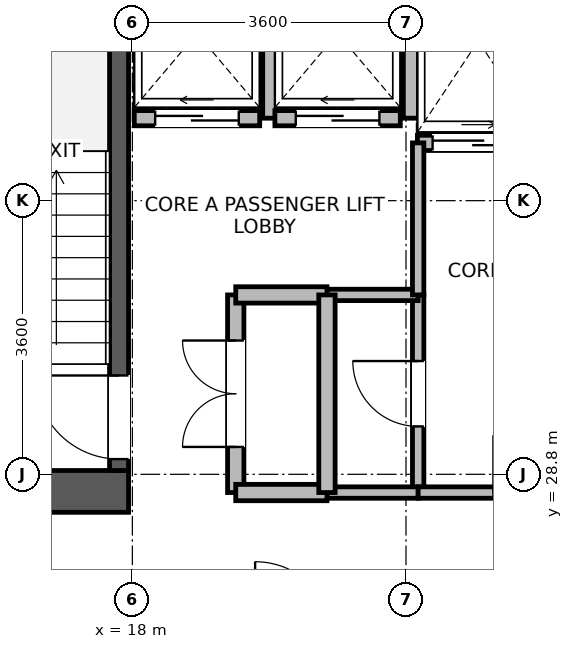
"""IFC4 building model, lengths in metres.
Left out: names, types, materials, properties, quantities, classifications, styles, units other than length and angle.
Written with IfcOpenShell. Run it as: python <this file> out.ifc"""

import sys

from ifc_helpers import new_model, si_unit, direction, frame, frame_2d, origin, place, context, subcontext, project, spatial, rectangle, extrude, element, fill, save


model = new_model("IFC4")
c1 = context("Model", 3, precision=1e-05, world=origin(), true_north=direction((0.0, 1.0)))
c2 = subcontext(c1, "Body", "Model", "MODEL_VIEW")
j1 = project(units=[si_unit("LENGTHUNIT", "METRE"), si_unit("PLANEANGLEUNIT", "RADIAN")], contexts=[c1])
p1 = place(None, origin())
s1 = spatial("IfcSite", under=j1, at=p1, CompositionType="ELEMENT")
p2 = place(p1, origin())
s2 = spatial("IfcBuilding", under=s1, at=p2, CompositionType="ELEMENT")
p3 = place(p2, frame((0.0, 0.0, 43.8)))
s3 = spatial("IfcBuildingStorey", under=s2, at=p3, CompositionType="ELEMENT", Elevation=43.8)
p4 = place(p3, frame((14.75, 28.575, 0.0), z_axis=(0.0, 0.0, 1.0), x_axis=(1.0, 0.0, 0.0)))
e1 = element("IfcWall", 1, at=p4, inside=s3, PredefinedType="SHEAR", context=c2, shape_type="SweptSolid", body=[
    extrude(rectangle(XDim=3.2, YDim=0.55, at=frame_2d((1.6, 0.0))), origin(), (0.0, 0.0, 1.0), 3.45),
])
p5 = place(p3, frame((17.825, 28.85, 0.0), z_axis=(0.0, 0.0, 1.0), x_axis=(0.0, 1.0, 0.0)))
e2 = element("IfcWall", 2, at=p5, inside=s3, PredefinedType="SHEAR", context=c2, shape_type="SweptSolid", body=[
    extrude(rectangle(XDim=7.0, YDim=0.25, at=frame_2d((3.5, 0.0))), origin(), (0.0, 0.0, 1.0), 3.45),
])
p6 = place(p5, frame((0.15, 0.0, 0.0)))
e3 = element("IfcOpeningElement", 3, at=p6, cuts=e2, PredefinedType="OPENING", context=c2, shape_type="SweptSolid", body=[
    extrude(rectangle(XDim=1.1, YDim=2.08, at=frame_2d((0.55, 1.04))), frame((0.0, 0.135, 0.0), z_axis=(0.0, -1.0, 0.0), x_axis=(1.0, 0.0, 0.0)), (0.0, 0.0, 1.0), 0.27),
])
p7 = place(p3, frame((18.025, 33.485, 0.0), z_axis=(0.0, 0.0, 1.0), x_axis=(1.0, 0.0, 0.0)))
e4 = element("IfcWall", 4, at=p7, inside=s3, PredefinedType="PARTITIONING", context=c2, shape_type="SweptSolid", body=[
    extrude(rectangle(XDim=1.65, YDim=0.2, at=frame_2d((0.825, 0.0))), origin(), (0.0, 0.0, 1.0), 3.43),
])
p8 = place(p7, frame((0.275, 0.0, 0.0)))
e5 = element("IfcOpeningElement", 5, at=p8, cuts=e4, PredefinedType="OPENING", context=c2, shape_type="SweptSolid", body=[
    extrude(rectangle(XDim=1.1, YDim=2.12, at=frame_2d((0.55, 1.06))), frame((0.0, 0.11, 0.0), z_axis=(0.0, -1.0, 0.0), x_axis=(1.0, 0.0, 0.0)), (0.0, 0.0, 1.0), 0.22),
])
p9 = place(p3, frame((19.815, 33.485, 0.0), z_axis=(0.0, 0.0, 1.0), x_axis=(0.0, 1.0, 0.0)))
e6 = element("IfcWall", 6, at=p9, inside=s3, PredefinedType="PARTITIONING", context=c2, shape_type="SweptSolid", body=[
    extrude(rectangle(XDim=2.23, YDim=0.2, at=frame_2d((1.115, 0.0))), origin(), (0.0, 0.0, 1.0), 3.43),
])
p10 = place(p3, frame((19.875, 33.485, 0.0), z_axis=(0.0, 0.0, 1.0), x_axis=(1.0, 0.0, 0.0)))
e7 = element("IfcWall", 7, at=p10, inside=s3, PredefinedType="PARTITIONING", context=c2, shape_type="SweptSolid", body=[
    extrude(rectangle(XDim=1.65, YDim=0.2, at=frame_2d((0.825, 0.0))), origin(), (0.0, 0.0, 1.0), 3.43),
])
p11 = place(p10, frame((0.275, 0.0, 0.0)))
e8 = element("IfcOpeningElement", 8, at=p11, cuts=e7, PredefinedType="OPENING", context=c2, shape_type="SweptSolid", body=[
    extrude(rectangle(XDim=1.1, YDim=2.12, at=frame_2d((0.55, 1.06))), frame((0.0, 0.11, 0.0), z_axis=(0.0, -1.0, 0.0), x_axis=(1.0, 0.0, 0.0)), (0.0, 0.0, 1.0), 0.22),
])
p12 = place(p3, frame((21.665, 33.485, 0.0), z_axis=(0.0, 0.0, 1.0), x_axis=(0.0, 1.0, 0.0)))
e9 = element("IfcWall", 9, at=p12, inside=s3, PredefinedType="PARTITIONING", context=c2, shape_type="SweptSolid", body=[
    extrude(rectangle(XDim=2.23, YDim=0.2, at=frame_2d((1.115, 0.0))), origin(), (0.0, 0.0, 1.0), 3.43),
])
p13 = place(p3, frame((21.75, 33.16, 0.0), z_axis=(0.0, 0.0, 1.0), x_axis=(1.0, 0.0, 0.0)))
e10 = element("IfcWall", 10, at=p13, inside=s3, PredefinedType="PARTITIONING", context=c2, shape_type="SweptSolid", body=[
    extrude(rectangle(XDim=1.6, YDim=0.2, at=frame_2d((0.8, 0.0))), origin(), (0.0, 0.0, 1.0), 3.43),
])
p14 = place(p13, frame((0.2, 0.0, 0.0)))
e11 = element("IfcOpeningElement", 11, at=p14, cuts=e10, PredefinedType="OPENING", context=c2, shape_type="SweptSolid", body=[
    extrude(rectangle(XDim=1.2, YDim=2.12, at=frame_2d((0.6, 1.06))), frame((0.0, 0.11, 0.0), z_axis=(0.0, -1.0, 0.0), x_axis=(1.0, 0.0, 0.0)), (0.0, 0.0, 1.0), 0.22),
])
p15 = place(p3, frame((19.36, 28.56, 0.0), z_axis=(0.0, 0.0, 1.0), x_axis=(0.0, 1.0, 0.0)))
e12 = element("IfcWall", 12, at=p15, inside=s3, PredefinedType="PARTITIONING", context=c2, shape_type="SweptSolid", body=[
    extrude(rectangle(XDim=2.6, YDim=0.215, at=frame_2d((1.3, 0.0))), origin(), (0.0, 0.0, 1.0), 3.43),
])
p16 = place(p15, frame((0.6, 0.0, 0.0)))
e13 = element("IfcOpeningElement", 13, at=p16, cuts=e12, PredefinedType="OPENING", context=c2, shape_type="SweptSolid", body=[
    extrude(rectangle(XDim=1.4, YDim=2.15, at=frame_2d((0.7, 1.075))), frame((0.0, 0.118, 0.0), z_axis=(0.0, -1.0, 0.0), x_axis=(1.0, 0.0, 0.0)), (0.0, 0.0, 1.0), 0.235),
])
p17 = place(p3, frame((21.76, 28.56, 0.0), z_axis=(0.0, 0.0, 1.0), x_axis=(0.0, 1.0, 0.0)))
e14 = element("IfcWall", 14, at=p17, inside=s3, PredefinedType="PARTITIONING", context=c2, shape_type="SweptSolid", body=[
    extrude(rectangle(XDim=2.6, YDim=0.15, at=frame_2d((1.3, 0.0))), origin(), (0.0, 0.0, 1.0), 3.43),
])
p18 = place(p17, frame((0.87, 0.0, 0.0)))
e15 = element("IfcOpeningElement", 15, at=p18, cuts=e14, PredefinedType="OPENING", context=c2, shape_type="SweptSolid", body=[
    extrude(rectangle(XDim=0.86, YDim=2.02, at=frame_2d((0.43, 1.01))), frame((0.0, 0.085, 0.0), z_axis=(0.0, -1.0, 0.0), x_axis=(1.0, 0.0, 0.0)), (0.0, 0.0, 1.0), 0.17),
])
p19 = place(p3, frame((20.56, 28.56, 0.0), z_axis=(0.0, 0.0, 1.0), x_axis=(1.0, 0.0, 0.0)))
e16 = element("IfcWall", 16, at=p19, inside=s3, PredefinedType="PARTITIONING", context=c2, shape_type="SweptSolid", body=[
    extrude(rectangle(XDim=1.2, YDim=0.15, at=frame_2d((0.6, 0.0))), origin(), (0.0, 0.0, 1.0), 2.23),
])
p20 = place(p3, frame((20.56, 31.16, 0.0), z_axis=(0.0, 0.0, 1.0), x_axis=(1.0, 0.0, 0.0)))
e17 = element("IfcWall", 17, at=p20, inside=s3, PredefinedType="PARTITIONING", context=c2, shape_type="SweptSolid", body=[
    extrude(rectangle(XDim=1.2, YDim=0.15, at=frame_2d((0.6, 0.0))), origin(), (0.0, 0.0, 1.0), 3.43),
])
p21 = place(p3, frame((19.36, 28.56, 0.0), z_axis=(0.0, 0.0, 1.0), x_axis=(1.0, 0.0, 0.0)))
e18 = element("IfcWall", 18, at=p21, inside=s3, PredefinedType="PARTITIONING", context=c2, shape_type="SweptSolid", body=[
    extrude(rectangle(XDim=1.2, YDim=0.215, at=frame_2d((0.6, 0.0))), origin(), (0.0, 0.0, 1.0), 2.23),
])
p22 = place(p3, frame((19.36, 31.16, 0.0), z_axis=(0.0, 0.0, 1.0), x_axis=(1.0, 0.0, 0.0)))
e19 = element("IfcWall", 19, at=p22, inside=s3, PredefinedType="PARTITIONING", context=c2, shape_type="SweptSolid", body=[
    extrude(rectangle(XDim=1.2, YDim=0.215, at=frame_2d((0.6, 0.0))), origin(), (0.0, 0.0, 1.0), 3.43),
])
p23 = place(p3, frame((21.76, 28.56, 0.0), z_axis=(0.0, 0.0, 1.0), x_axis=(1.0, 0.0, 0.0)))
e20 = element("IfcWall", 20, at=p23, inside=s3, PredefinedType="PARTITIONING", context=c2, shape_type="SweptSolid", body=[
    extrude(rectangle(XDim=3.48, YDim=0.15, at=frame_2d((1.74, 0.0))), origin(), (0.0, 0.0, 1.0), 2.23),
])
p24 = place(p23, frame((0.99, 0.0, 0.0)))
e21 = element("IfcOpeningElement", 21, at=p24, cuts=e20, PredefinedType="OPENING", context=c2, shape_type="SweptSolid", body=[
    extrude(rectangle(XDim=1.5, YDim=2.1, at=frame_2d((0.75, 1.05))), frame((0.0, 0.085, 0.0), z_axis=(0.0, -1.0, 0.0), x_axis=(1.0, 0.0, 0.0)), (0.0, 0.0, 1.0), 0.17),
])
p25 = place(p3, frame((20.56, 28.56, 0.0), z_axis=(0.0, 0.0, 1.0), x_axis=(0.0, 1.0, 0.0)))
e22 = element("IfcWall", 22, at=p25, inside=s3, PredefinedType="PARTITIONING", context=c2, shape_type="SweptSolid", body=[
    extrude(rectangle(XDim=2.6, YDim=0.215, at=frame_2d((1.3, 0.0))), origin(), (0.0, 0.0, 1.0), 3.43),
])
p26 = place(p3, frame((21.76, 31.16, 0.0), z_axis=(0.0, 0.0, 1.0), x_axis=(0.0, 1.0, 0.0)))
e23 = element("IfcWall", 23, at=p26, inside=s3, PredefinedType="PARTITIONING", context=c2, shape_type="SweptSolid", body=[
    extrude(rectangle(XDim=2.0, YDim=0.15, at=frame_2d((1.0, 0.0))), origin(), (0.0, 0.0, 1.0), 3.43),
])
p27 = place(p6, origin())
e24 = element("IfcDoor", 24, at=p27, inside=s3, OperationType="SINGLE_SWING_RIGHT", PredefinedType="DOOR", context=c2, shape_type="SweptSolid", body=[
    extrude(rectangle(XDim=1.1, YDim=2.08, at=frame_2d((0.55, 1.04))), frame((0.0, 0.025, 0.0), z_axis=(0.0, -1.0, 0.0), x_axis=(1.0, 0.0, 0.0)), (0.0, 0.0, 1.0), 0.05),
])
fill(e3, e24)
p28 = place(p8, origin())
e25 = element("IfcDoor", 25, at=p28, inside=s3, OperationType="SLIDING_TO_LEFT", PredefinedType="DOOR", context=c2, shape_type="SweptSolid", body=[
    extrude(rectangle(XDim=1.1, YDim=2.12, at=frame_2d((0.55, 1.06))), frame((0.0, 0.025, 0.0), z_axis=(0.0, -1.0, 0.0), x_axis=(1.0, 0.0, 0.0)), (0.0, 0.0, 1.0), 0.05),
])
fill(e5, e25)
p29 = place(p11, origin())
e26 = element("IfcDoor", 26, at=p29, inside=s3, OperationType="SLIDING_TO_LEFT", PredefinedType="DOOR", context=c2, shape_type="SweptSolid", body=[
    extrude(rectangle(XDim=1.1, YDim=2.12, at=frame_2d((0.55, 1.06))), frame((0.0, 0.025, 0.0), z_axis=(0.0, -1.0, 0.0), x_axis=(1.0, 0.0, 0.0)), (0.0, 0.0, 1.0), 0.05),
])
fill(e8, e26)
p30 = place(p14, origin())
e27 = element("IfcDoor", 27, at=p30, inside=s3, OperationType="SLIDING_TO_RIGHT", PredefinedType="DOOR", context=c2, shape_type="SweptSolid", body=[
    extrude(rectangle(XDim=1.2, YDim=2.12, at=frame_2d((0.6, 1.06))), frame((0.0, 0.025, 0.0), z_axis=(0.0, -1.0, 0.0), x_axis=(1.0, 0.0, 0.0)), (0.0, 0.0, 1.0), 0.05),
])
fill(e11, e27)
p31 = place(p16, origin())
e28 = element("IfcDoor", 28, at=p31, inside=s3, OperationType="DOUBLE_DOOR_SINGLE_SWING", PredefinedType="DOOR", context=c2, shape_type="SweptSolid", body=[
    extrude(rectangle(XDim=1.4, YDim=2.15, at=frame_2d((0.7, 1.075))), frame((0.0, 0.025, 0.0), z_axis=(0.0, -1.0, 0.0), x_axis=(1.0, 0.0, 0.0)), (0.0, 0.0, 1.0), 0.05),
])
fill(e13, e28)
p32 = place(p18, origin())
e29 = element("IfcDoor", 29, at=p32, inside=s3, OperationType="SINGLE_SWING_RIGHT", PredefinedType="DOOR", context=c2, shape_type="SweptSolid", body=[
    extrude(rectangle(XDim=0.86, YDim=2.02, at=frame_2d((0.43, 1.01))), frame((0.0, 0.025, 0.0), z_axis=(0.0, -1.0, 0.0), x_axis=(1.0, 0.0, 0.0)), (0.0, 0.0, 1.0), 0.05),
])
fill(e15, e29)
save(model, sys.argv[1])
